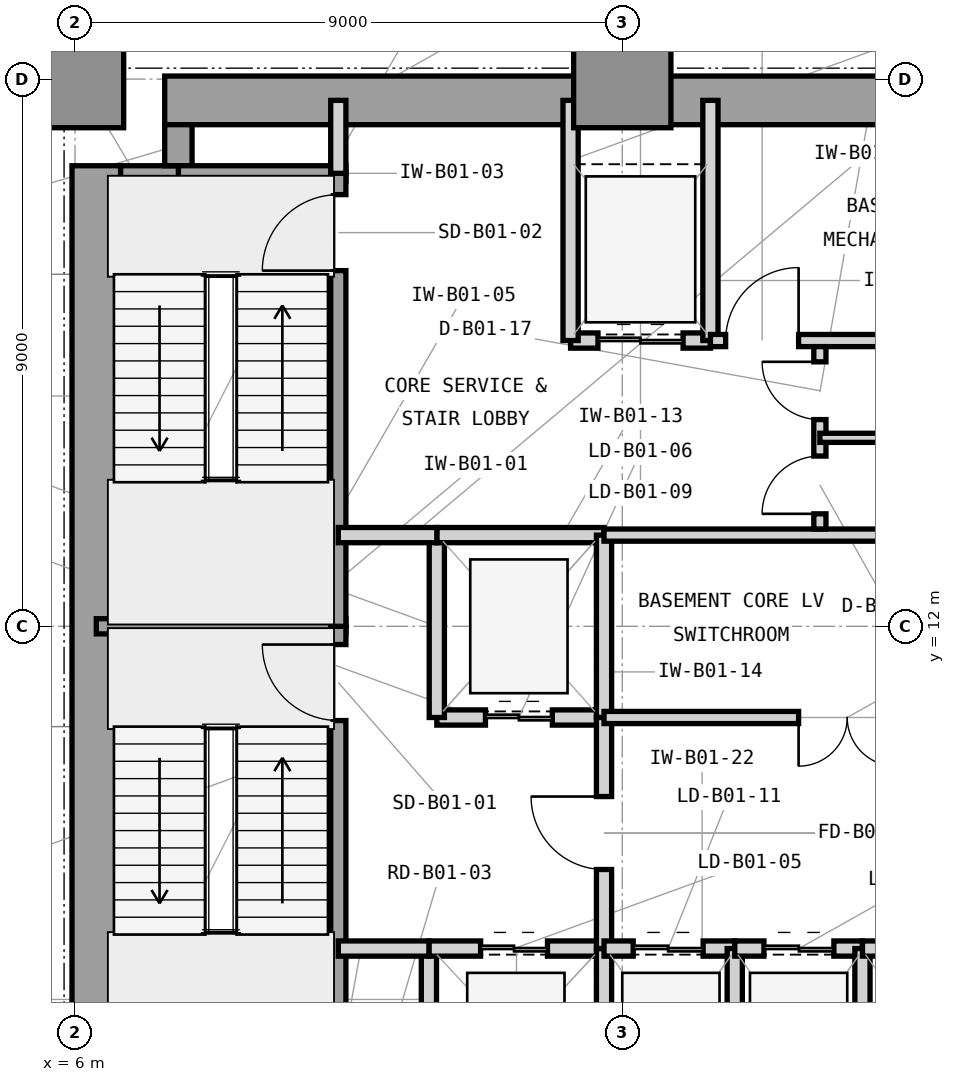
"""IFC4 building model, lengths in metres.
Left out: names, types, materials, properties, quantities, classifications, styles, units other than length and angle.
Written with IfcOpenShell. Run it as: python <this file> out.ifc"""

import sys

from ifc_helpers import new_model, si_unit, direction, frame, frame_2d, origin, origin_2d, place, context, subcontext, project, spatial, rectangle, extrude, element, fill, save


model = new_model("IFC4")
c1 = context("Model", 3, precision=1e-05, world=origin(), true_north=direction((0.0, 1.0)))
c2 = subcontext(c1, "Body", "Model", "MODEL_VIEW")
j1 = project(units=[si_unit("LENGTHUNIT", "METRE"), si_unit("PLANEANGLEUNIT", "RADIAN")], contexts=[c1])
p1 = place(None, origin())
s1 = spatial("IfcSite", under=j1, at=p1, CompositionType="ELEMENT")
p2 = place(p1, origin())
s2 = spatial("IfcBuilding", under=s1, at=p2, CompositionType="ELEMENT")
p3 = place(p2, frame((0.0, 0.0, -4.5)))
s3 = spatial("IfcBuildingStorey", under=s2, at=p3, CompositionType="ELEMENT", Elevation=-4.5)
p4 = place(p3, frame((6.35, 4.425, 0.0), z_axis=(0.0, 0.0, 1.0), x_axis=(0.0, 1.0, 0.0)))
e1 = element("IfcWall", 1, at=p4, inside=s3, PredefinedType="SHEAR", context=c2, shape_type="SweptSolid", body=[
    extrude(rectangle(XDim=15.15, YDim=0.8, at=frame_2d((7.575, 0.0))), origin(), (0.0, 0.0, 1.0), 4.5),
])
p5 = place(p3, frame((7.475, 20.65, 0.0), z_axis=(0.0, 0.0, 1.0), x_axis=(1.0, 0.0, 0.0)))
e2 = element("IfcWall", 2, at=p5, inside=s3, PredefinedType="SHEAR", context=c2, shape_type="SweptSolid", body=[
    extrude(rectangle(XDim=12.325, YDim=0.8, at=frame_2d((6.163, 0.0))), origin(), (0.0, 0.0, 1.0), 4.5),
])
p6 = place(p3, frame((6.75, 19.35, 0.0), z_axis=(0.0, 0.0, 1.0), x_axis=(1.0, 0.0, 0.0)))
e3 = element("IfcWall", 3, at=p6, inside=s3, PredefinedType="SHEAR", context=c2, shape_type="SweptSolid", body=[
    extrude(rectangle(XDim=1.175, YDim=0.45, at=frame_2d((0.587, 0.0))), origin(), (0.0, 0.0, 1.0), 4.5),
])
p7 = place(p3, frame((7.7, 19.575, 0.0), z_axis=(0.0, 0.0, 1.0), x_axis=(0.0, 1.0, 0.0)))
e4 = element("IfcWall", 4, at=p7, inside=s3, PredefinedType="SHEAR", context=c2, shape_type="SweptSolid", body=[
    extrude(rectangle(XDim=0.675, YDim=0.45, at=frame_2d((0.337, 0.0))), origin(), (0.0, 0.0, 1.0), 4.5),
])
for number, where, z_axis, x_axis in (
    (5, (6.0, 21.0, 0.0), (0.0, 0.0, 1.0), (1.0, 0.0, 0.0)),
    (6, (15.0, 21.0, 0.0), (0.0, 0.0, 1.0), (1.0, 0.0, 0.0)),
):
    element("IfcColumn", number, at=place(p3, frame(where, z_axis=z_axis, x_axis=x_axis)), inside=s3, PredefinedType="COLUMN", context=c2, shape_type="SweptSolid", body=[
        extrude(rectangle(XDim=1.6, YDim=1.6, at=origin_2d()), origin(), (0.0, 0.0, 1.0), 4.5),
    ])
p8 = place(p3, frame((6.35, 12.0, 0.0), z_axis=(0.0, 0.0, 1.0), x_axis=(1.0, 0.0, 0.0)))
e7 = element("IfcWall", 7, at=p8, inside=s3, PredefinedType="SHEAR", context=c2, shape_type="SweptSolid", body=[
    extrude(rectangle(XDim=4.105, YDim=0.25, at=frame_2d((2.052, 0.0))), origin(), (0.0, 0.0, 1.0), 4.5),
])
p9 = place(p3, frame((7.7, 19.45, 0.0), z_axis=(0.0, 0.0, 1.0), x_axis=(1.0, 0.0, 0.0)))
e8 = element("IfcWall", 8, at=p9, inside=s3, PredefinedType="SHEAR", context=c2, shape_type="SweptSolid", body=[
    extrude(rectangle(XDim=2.755, YDim=0.25, at=frame_2d((1.377, 0.0))), origin(), (0.0, 0.0, 1.0), 4.5),
])
p10 = place(p3, frame((10.33, 4.55, 0.0), z_axis=(0.0, 0.0, 1.0), x_axis=(0.0, 1.0, 0.0)))
e9 = element("IfcWall", 9, at=p10, inside=s3, PredefinedType="SHEAR", context=c2, shape_type="SweptSolid", body=[
    extrude(rectangle(XDim=7.45, YDim=0.25, at=frame_2d((3.725, 0.0))), origin(), (0.0, 0.0, 1.0), 4.5),
])
p11 = place(p10, frame((5.9, 0.0, 0.0)))
e10 = element("IfcOpeningElement", 10, at=p11, cuts=e9, PredefinedType="OPENING", context=c2, shape_type="SweptSolid", body=[
    extrude(rectangle(XDim=1.25, YDim=2.2, at=frame_2d((0.625, 1.1))), frame((0.0, 0.135, 0.0), z_axis=(0.0, -1.0, 0.0), x_axis=(1.0, 0.0, 0.0)), (0.0, 0.0, 1.0), 0.27),
])
p12 = place(p3, frame((10.33, 12.0, 0.0), z_axis=(0.0, 0.0, 1.0), x_axis=(0.0, 1.0, 0.0)))
e11 = element("IfcWall", 11, at=p12, inside=s3, PredefinedType="SHEAR", context=c2, shape_type="SweptSolid", body=[
    extrude(rectangle(XDim=7.45, YDim=0.25, at=frame_2d((3.725, 0.0))), origin(), (0.0, 0.0, 1.0), 4.5),
])
p13 = place(p12, frame((5.85, 0.0, 0.0)))
e12 = element("IfcOpeningElement", 12, at=p13, cuts=e11, PredefinedType="OPENING", context=c2, shape_type="SweptSolid", body=[
    extrude(rectangle(XDim=1.25, YDim=2.2, at=frame_2d((0.625, 1.1))), frame((0.0, 0.135, 0.0), z_axis=(0.0, -1.0, 0.0), x_axis=(1.0, 0.0, 0.0)), (0.0, 0.0, 1.0), 0.27),
])
p14 = place(p3, frame((11.82, 3.35, 0.0), z_axis=(0.0, 0.0, 1.0), x_axis=(0.0, 1.0, 0.0)))
e13 = element("IfcWall", 13, at=p14, inside=s3, PredefinedType="PARTITIONING", context=c2, shape_type="SweptSolid", body=[
    extrude(rectangle(XDim=3.35, YDim=0.25, at=frame_2d((1.675, 0.0))), origin(), (0.0, 0.0, 1.0), 4.19),
])
p15 = place(p3, frame((10.33, 19.45, 0.0), z_axis=(0.0, 0.0, 1.0), x_axis=(0.0, 1.0, 0.0)))
e14 = element("IfcWall", 14, at=p15, inside=s3, PredefinedType="PARTITIONING", context=c2, shape_type="SweptSolid", body=[
    extrude(rectangle(XDim=1.2, YDim=0.25, at=frame_2d((0.6, 0.0))), origin(), (0.0, 0.0, 1.0), 3.334),
])
p16 = place(p3, frame((11.82, 6.7, 0.0), z_axis=(0.0, 0.0, 1.0), x_axis=(1.0, 0.0, 0.0)))
e15 = element("IfcWall", 15, at=p16, inside=s3, PredefinedType="PARTITIONING", context=c2, shape_type="SweptSolid", body=[
    extrude(rectangle(XDim=2.88, YDim=0.25, at=frame_2d((1.44, 0.0))), origin(), (0.0, 0.0, 1.0), 3.573),
])
p17 = place(p16, frame((0.85, 0.0, 0.0)))
e16 = element("IfcOpeningElement", 16, at=p17, cuts=e15, PredefinedType="OPENING", context=c2, shape_type="SweptSolid", body=[
    extrude(rectangle(XDim=1.1, YDim=2.25, at=frame_2d((0.55, 1.125))), frame((0.0, 0.135, 0.0), z_axis=(0.0, -1.0, 0.0), x_axis=(1.0, 0.0, 0.0)), (0.0, 0.0, 1.0), 0.27),
])
p18 = place(p3, frame((14.7, 3.35, 0.0), z_axis=(0.0, 0.0, 1.0), x_axis=(0.0, 1.0, 0.0)))
e17 = element("IfcWall", 17, at=p18, inside=s3, PredefinedType="PARTITIONING", context=c2, shape_type="SweptSolid", body=[
    extrude(rectangle(XDim=3.35, YDim=0.25, at=frame_2d((1.675, 0.0))), origin(), (0.0, 0.0, 1.0), 4.19),
])
p19 = place(p3, frame((11.95, 10.5, 0.0), z_axis=(0.0, 0.0, 1.0), x_axis=(1.0, 0.0, 0.0)))
e18 = element("IfcWall", 18, at=p19, inside=s3, PredefinedType="PARTITIONING", context=c2, shape_type="SweptSolid", body=[
    extrude(rectangle(XDim=2.75, YDim=0.25, at=frame_2d((1.375, 0.0))), origin(), (0.0, 0.0, 1.0), 3.573),
])
p20 = place(p19, frame((0.8, 0.0, 0.0)))
e19 = element("IfcOpeningElement", 19, at=p20, cuts=e18, PredefinedType="OPENING", context=c2, shape_type="SweptSolid", body=[
    extrude(rectangle(XDim=1.1, YDim=2.25, at=frame_2d((0.55, 1.125))), frame((0.0, 0.135, 0.0), z_axis=(0.0, -1.0, 0.0), x_axis=(1.0, 0.0, 0.0)), (0.0, 0.0, 1.0), 0.27),
])
p21 = place(p3, frame((11.95, 10.5, 0.0), z_axis=(0.0, 0.0, 1.0), x_axis=(0.0, 1.0, 0.0)))
e20 = element("IfcWall", 20, at=p21, inside=s3, PredefinedType="PARTITIONING", context=c2, shape_type="SweptSolid", body=[
    extrude(rectangle(XDim=3.0, YDim=0.25, at=frame_2d((1.5, 0.0))), origin(), (0.0, 0.0, 1.0), 4.19),
])
p22 = place(p3, frame((11.95, 13.5, 0.0), z_axis=(0.0, 0.0, 1.0), x_axis=(1.0, 0.0, 0.0)))
e21 = element("IfcWall", 21, at=p22, inside=s3, PredefinedType="PARTITIONING", context=c2, shape_type="SweptSolid", body=[
    extrude(rectangle(XDim=2.75, YDim=0.25, at=frame_2d((1.375, 0.0))), origin(), (0.0, 0.0, 1.0), 3.573),
])
p23 = place(p3, frame((14.7, 10.5, 0.0), z_axis=(0.0, 0.0, 1.0), x_axis=(0.0, 1.0, 0.0)))
e22 = element("IfcWall", 22, at=p23, inside=s3, PredefinedType="PARTITIONING", context=c2, shape_type="SweptSolid", body=[
    extrude(rectangle(XDim=3.0, YDim=0.25, at=frame_2d((1.5, 0.0))), origin(), (0.0, 0.0, 1.0), 4.19),
])
p24 = place(p3, frame((14.7, 6.7, 0.0), z_axis=(0.0, 0.0, 1.0), x_axis=(0.0, 1.0, 0.0)))
e23 = element("IfcWall", 23, at=p24, inside=s3, PredefinedType="PARTITIONING", context=c2, shape_type="SweptSolid", body=[
    extrude(rectangle(XDim=3.8, YDim=0.25, at=frame_2d((1.9, 0.0))), origin(), (0.0, 0.0, 1.0), 4.19),
])
p25 = place(p24, frame((1.3, 0.0, 0.0)))
e24 = element("IfcOpeningElement", 24, at=p25, cuts=e23, PredefinedType="OPENING", context=c2, shape_type="SweptSolid", body=[
    extrude(rectangle(XDim=1.2, YDim=2.2, at=frame_2d((0.6, 1.1))), frame((0.0, 0.135, 0.0), z_axis=(0.0, -1.0, 0.0), x_axis=(1.0, 0.0, 0.0)), (0.0, 0.0, 1.0), 0.27),
])
p26 = place(p3, frame((10.33, 13.5, 0.0), z_axis=(0.0, 0.0, 1.0), x_axis=(1.0, 0.0, 0.0)))
e25 = element("IfcWall", 25, at=p26, inside=s3, PredefinedType="PARTITIONING", context=c2, shape_type="SweptSolid", body=[
    extrude(rectangle(XDim=1.62, YDim=0.25, at=frame_2d((0.81, 0.0))), origin(), (0.0, 0.0, 1.0), 3.573),
])
p27 = place(p3, frame((10.33, 6.7, 0.0), z_axis=(0.0, 0.0, 1.0), x_axis=(1.0, 0.0, 0.0)))
e26 = element("IfcWall", 26, at=p27, inside=s3, PredefinedType="PARTITIONING", context=c2, shape_type="SweptSolid", body=[
    extrude(rectangle(XDim=1.49, YDim=0.25, at=frame_2d((0.745, 0.0))), origin(), (0.0, 0.0, 1.0), 3.573),
])
p28 = place(p3, frame((14.15, 16.7, 0.0), z_axis=(0.0, 0.0, 1.0), x_axis=(1.0, 0.0, 0.0)))
e27 = element("IfcWall", 27, at=p28, inside=s3, PredefinedType="PARTITIONING", context=c2, shape_type="SweptSolid", body=[
    extrude(rectangle(XDim=2.3, YDim=0.25, at=frame_2d((1.15, 0.0))), origin(), (0.0, 0.0, 1.0), 3.573),
])
p29 = place(p28, frame((0.45, 0.0, 0.0)))
e28 = element("IfcOpeningElement", 28, at=p29, cuts=e27, PredefinedType="OPENING", context=c2, shape_type="SweptSolid", body=[
    extrude(rectangle(XDim=1.4, YDim=2.35, at=frame_2d((0.7, 1.175))), frame((0.0, 0.135, 0.0), z_axis=(0.0, -1.0, 0.0), x_axis=(1.0, 0.0, 0.0)), (0.0, 0.0, 1.0), 0.27),
])
for number, where, z_axis, x_axis in (
    (29, (14.15, 16.7, 0.0), (0.0, 0.0, 1.0), (0.0, 1.0, 0.0)),
    (30, (16.45, 16.7, 0.0), (0.0, 0.0, 1.0), (0.0, 1.0, 0.0)),
):
    element("IfcWall", number, at=place(p3, frame(where, z_axis=z_axis, x_axis=x_axis)), inside=s3, PredefinedType="PARTITIONING", context=c2, shape_type="SweptSolid", body=[
        extrude(rectangle(XDim=3.95, YDim=0.25, at=frame_2d((1.975, 0.0))), origin(), (0.0, 0.0, 1.0), 4.19),
    ])
p30 = place(p3, frame((16.45, 16.7, 0.0), z_axis=(0.0, 0.0, 1.0), x_axis=(1.0, 0.0, 0.0)))
e31 = element("IfcWall", 31, at=p30, inside=s3, PredefinedType="PARTITIONING", context=c2, shape_type="SweptSolid", body=[
    extrude(rectangle(XDim=7.2, YDim=0.2, at=frame_2d((3.6, 0.0))), origin(), (0.0, 0.0, 1.0), 3.573),
])
p31 = place(p30, frame((0.25, 0.0, 0.0)))
e32 = element("IfcOpeningElement", 32, at=p31, cuts=e31, PredefinedType="OPENING", context=c2, shape_type="SweptSolid", body=[
    extrude(rectangle(XDim=1.2, YDim=2.2, at=frame_2d((0.6, 1.1))), frame((0.0, 0.11, 0.0), z_axis=(0.0, -1.0, 0.0), x_axis=(1.0, 0.0, 0.0)), (0.0, 0.0, 1.0), 0.22),
])
p32 = place(p3, frame((14.7, 6.7, 0.0), z_axis=(0.0, 0.0, 1.0), x_axis=(1.0, 0.0, 0.0)))
e33 = element("IfcWall", 33, at=p32, inside=s3, PredefinedType="PARTITIONING", context=c2, shape_type="SweptSolid", body=[
    extrude(rectangle(XDim=2.15, YDim=0.25, at=frame_2d((1.075, 0.0))), origin(), (0.0, 0.0, 1.0), 3.573),
])
p33 = place(p32, frame((0.48, 0.0, 0.0)))
e34 = element("IfcOpeningElement", 34, at=p33, cuts=e33, PredefinedType="OPENING", context=c2, shape_type="SweptSolid", body=[
    extrude(rectangle(XDim=1.15, YDim=2.25, at=frame_2d((0.575, 1.125))), frame((0.0, 0.135, 0.0), z_axis=(0.0, -1.0, 0.0), x_axis=(1.0, 0.0, 0.0)), (0.0, 0.0, 1.0), 0.27),
])
p34 = place(p3, frame((16.85, 3.35, 0.0), z_axis=(0.0, 0.0, 1.0), x_axis=(0.0, 1.0, 0.0)))
e35 = element("IfcWall", 35, at=p34, inside=s3, PredefinedType="PARTITIONING", context=c2, shape_type="SweptSolid", body=[
    extrude(rectangle(XDim=3.35, YDim=0.25, at=frame_2d((1.675, 0.0))), origin(), (0.0, 0.0, 1.0), 4.19),
])
p35 = place(p3, frame((16.85, 6.7, 0.0), z_axis=(0.0, 0.0, 1.0), x_axis=(1.0, 0.0, 0.0)))
e36 = element("IfcWall", 36, at=p35, inside=s3, PredefinedType="PARTITIONING", context=c2, shape_type="SweptSolid", body=[
    extrude(rectangle(XDim=2.1, YDim=0.25, at=frame_2d((1.05, 0.0))), origin(), (0.0, 0.0, 1.0), 3.573),
])
p36 = place(p35, frame((0.48, 0.0, 0.0)))
e37 = element("IfcOpeningElement", 37, at=p36, cuts=e36, PredefinedType="OPENING", context=c2, shape_type="SweptSolid", body=[
    extrude(rectangle(XDim=1.15, YDim=2.25, at=frame_2d((0.575, 1.125))), frame((0.0, 0.135, 0.0), z_axis=(0.0, -1.0, 0.0), x_axis=(1.0, 0.0, 0.0)), (0.0, 0.0, 1.0), 0.27),
])
p37 = place(p3, frame((18.95, 3.35, 0.0), z_axis=(0.0, 0.0, 1.0), x_axis=(0.0, 1.0, 0.0)))
e38 = element("IfcWall", 38, at=p37, inside=s3, PredefinedType="PARTITIONING", context=c2, shape_type="SweptSolid", body=[
    extrude(rectangle(XDim=3.35, YDim=0.25, at=frame_2d((1.675, 0.0))), origin(), (0.0, 0.0, 1.0), 4.19),
])
p38 = place(p3, frame((18.95, 6.7, 0.0), z_axis=(0.0, 0.0, 1.0), x_axis=(1.0, 0.0, 0.0)))
e39 = element("IfcWall", 39, at=p38, inside=s3, PredefinedType="PARTITIONING", context=c2, shape_type="SweptSolid", body=[
    extrude(rectangle(XDim=2.1, YDim=0.25, at=frame_2d((1.05, 0.0))), origin(), (0.0, 0.0, 1.0), 3.573),
])
p39 = place(p38, frame((0.48, 0.0, 0.0)))
e40 = element("IfcOpeningElement", 40, at=p39, cuts=e39, PredefinedType="OPENING", context=c2, shape_type="SweptSolid", body=[
    extrude(rectangle(XDim=1.15, YDim=2.25, at=frame_2d((0.575, 1.125))), frame((0.0, 0.135, 0.0), z_axis=(0.0, -1.0, 0.0), x_axis=(1.0, 0.0, 0.0)), (0.0, 0.0, 1.0), 0.27),
])
p40 = place(p3, frame((14.7, 10.5, 0.0), z_axis=(0.0, 0.0, 1.0), x_axis=(1.0, 0.0, 0.0)))
e41 = element("IfcWall", 41, at=p40, inside=s3, PredefinedType="PARTITIONING", context=c2, shape_type="SweptSolid", body=[
    extrude(rectangle(XDim=8.95, YDim=0.2, at=frame_2d((4.475, 0.0))), origin(), (0.0, 0.0, 1.0), 3.573),
])
p41 = place(p40, frame((3.2, 0.0, 0.0)))
e42 = element("IfcOpeningElement", 42, at=p41, cuts=e41, PredefinedType="OPENING", context=c2, shape_type="SweptSolid", body=[
    extrude(rectangle(XDim=1.6, YDim=2.3, at=frame_2d((0.8, 1.15))), frame((0.0, 0.11, 0.0), z_axis=(0.0, -1.0, 0.0), x_axis=(1.0, 0.0, 0.0)), (0.0, 0.0, 1.0), 0.22),
])
p42 = place(p3, frame((14.7, 13.5, 0.0), z_axis=(0.0, 0.0, 1.0), x_axis=(1.0, 0.0, 0.0)))
e43 = element("IfcWall", 43, at=p42, inside=s3, PredefinedType="PARTITIONING", context=c2, shape_type="SweptSolid", body=[
    extrude(rectangle(XDim=8.95, YDim=0.2, at=frame_2d((4.475, 0.0))), origin(), (0.0, 0.0, 1.0), 3.573),
])
p43 = place(p3, frame((18.25, 13.6, 0.0), z_axis=(0.0, 0.0, 1.0), x_axis=(0.0, 1.0, 0.0)))
e44 = element("IfcWall", 44, at=p43, inside=s3, PredefinedType="PARTITIONING", context=c2, shape_type="SweptSolid", body=[
    extrude(rectangle(XDim=3.0, YDim=0.2, at=frame_2d((1.5, 0.0))), origin(), (0.0, 0.0, 1.0), 4.19),
])
p44 = place(p43, frame((0.25, 0.0, 0.0)))
e45 = element("IfcOpeningElement", 45, at=p44, cuts=e44, PredefinedType="OPENING", context=c2, shape_type="SweptSolid", body=[
    extrude(rectangle(XDim=0.95, YDim=2.1, at=frame_2d((0.475, 1.05))), frame((0.0, 0.11, 0.0), z_axis=(0.0, -1.0, 0.0), x_axis=(1.0, 0.0, 0.0)), (0.0, 0.0, 1.0), 0.22),
])
p45 = place(p43, frame((1.8, 0.0, 0.0)))
e46 = element("IfcOpeningElement", 46, at=p45, cuts=e44, PredefinedType="OPENING", context=c2, shape_type="SweptSolid", body=[
    extrude(rectangle(XDim=0.95, YDim=2.1, at=frame_2d((0.475, 1.05))), frame((0.0, 0.11, 0.0), z_axis=(0.0, -1.0, 0.0), x_axis=(1.0, 0.0, 0.0)), (0.0, 0.0, 1.0), 0.22),
])
p46 = place(p3, frame((18.25, 15.1, 0.0), z_axis=(0.0, 0.0, 1.0), x_axis=(1.0, 0.0, 0.0)))
e47 = element("IfcWall", 47, at=p46, inside=s3, PredefinedType="PARTITIONING", context=c2, shape_type="SweptSolid", body=[
    extrude(rectangle(XDim=5.4, YDim=0.15, at=frame_2d((2.7, 0.0))), origin(), (0.0, 0.0, 1.0), 4.19),
])
p47 = place(p11, origin())
e48 = element("IfcDoor", 48, at=p47, inside=s3, OperationType="SINGLE_SWING_RIGHT", PredefinedType="DOOR", context=c2, shape_type="SweptSolid", body=[
    extrude(rectangle(XDim=1.25, YDim=2.2, at=frame_2d((0.625, 1.1))), frame((0.0, 0.025, 0.0), z_axis=(0.0, -1.0, 0.0), x_axis=(1.0, 0.0, 0.0)), (0.0, 0.0, 1.0), 0.05),
])
fill(e10, e48)
p48 = place(p13, origin())
e49 = element("IfcDoor", 49, at=p48, inside=s3, OperationType="SINGLE_SWING_LEFT", PredefinedType="DOOR", context=c2, shape_type="SweptSolid", body=[
    extrude(rectangle(XDim=1.25, YDim=2.2, at=frame_2d((0.625, 1.1))), frame((0.0, 0.025, 0.0), z_axis=(0.0, -1.0, 0.0), x_axis=(1.0, 0.0, 0.0)), (0.0, 0.0, 1.0), 0.05),
])
fill(e12, e49)
p49 = place(p17, origin())
e50 = element("IfcDoor", 50, at=p49, inside=s3, OperationType="DOUBLE_DOOR_SLIDING", PredefinedType="DOOR", context=c2, shape_type="SweptSolid", body=[
    extrude(rectangle(XDim=1.1, YDim=2.25, at=frame_2d((0.55, 1.125))), frame((0.0, 0.025, 0.0), z_axis=(0.0, -1.0, 0.0), x_axis=(1.0, 0.0, 0.0)), (0.0, 0.0, 1.0), 0.05),
])
fill(e16, e50)
p50 = place(p20, origin())
e51 = element("IfcDoor", 51, at=p50, inside=s3, OperationType="DOUBLE_DOOR_SLIDING", PredefinedType="DOOR", context=c2, shape_type="SweptSolid", body=[
    extrude(rectangle(XDim=1.1, YDim=2.25, at=frame_2d((0.55, 1.125))), frame((0.0, 0.025, 0.0), z_axis=(0.0, -1.0, 0.0), x_axis=(1.0, 0.0, 0.0)), (0.0, 0.0, 1.0), 0.05),
])
fill(e19, e51)
p51 = place(p25, origin())
e52 = element("IfcDoor", 52, at=p51, inside=s3, OperationType="SINGLE_SWING_RIGHT", PredefinedType="DOOR", context=c2, shape_type="SweptSolid", body=[
    extrude(rectangle(XDim=1.2, YDim=2.2, at=frame_2d((0.6, 1.1))), frame((0.0, 0.025, 0.0), z_axis=(0.0, -1.0, 0.0), x_axis=(1.0, 0.0, 0.0)), (0.0, 0.0, 1.0), 0.05),
])
fill(e24, e52)
p52 = place(p29, origin())
e53 = element("IfcDoor", 53, at=p52, inside=s3, OperationType="DOUBLE_DOOR_SLIDING", PredefinedType="DOOR", context=c2, shape_type="SweptSolid", body=[
    extrude(rectangle(XDim=1.4, YDim=2.35, at=frame_2d((0.7, 1.175))), frame((0.0, 0.025, 0.0), z_axis=(0.0, -1.0, 0.0), x_axis=(1.0, 0.0, 0.0)), (0.0, 0.0, 1.0), 0.05),
])
fill(e28, e53)
p53 = place(p31, origin())
e54 = element("IfcDoor", 54, at=p53, inside=s3, OperationType="SINGLE_SWING_RIGHT", PredefinedType="DOOR", context=c2, shape_type="SweptSolid", body=[
    extrude(rectangle(XDim=1.2, YDim=2.2, at=frame_2d((0.6, 1.1))), frame((0.0, 0.025, 0.0), z_axis=(0.0, -1.0, 0.0), x_axis=(1.0, 0.0, 0.0)), (0.0, 0.0, 1.0), 0.05),
])
fill(e32, e54)
p54 = place(p33, origin())
e55 = element("IfcDoor", 55, at=p54, inside=s3, OperationType="DOUBLE_DOOR_SLIDING", PredefinedType="DOOR", context=c2, shape_type="SweptSolid", body=[
    extrude(rectangle(XDim=1.15, YDim=2.25, at=frame_2d((0.575, 1.125))), frame((0.0, 0.025, 0.0), z_axis=(0.0, -1.0, 0.0), x_axis=(1.0, 0.0, 0.0)), (0.0, 0.0, 1.0), 0.05),
])
fill(e34, e55)
p55 = place(p36, origin())
e56 = element("IfcDoor", 56, at=p55, inside=s3, OperationType="DOUBLE_DOOR_SLIDING", PredefinedType="DOOR", context=c2, shape_type="SweptSolid", body=[
    extrude(rectangle(XDim=1.15, YDim=2.25, at=frame_2d((0.575, 1.125))), frame((0.0, 0.025, 0.0), z_axis=(0.0, -1.0, 0.0), x_axis=(1.0, 0.0, 0.0)), (0.0, 0.0, 1.0), 0.05),
])
fill(e37, e56)
p56 = place(p41, frame((1.6, 0.0, 0.0), z_axis=(0.0, 0.0, 1.0), x_axis=(-1.0, 0.0, 0.0)))
e57 = element("IfcDoor", 57, at=p56, inside=s3, OperationType="DOUBLE_DOOR_SINGLE_SWING", PredefinedType="DOOR", context=c2, shape_type="SweptSolid", body=[
    extrude(rectangle(XDim=1.6, YDim=2.3, at=frame_2d((0.8, 1.15))), frame((0.0, 0.025, 0.0), z_axis=(0.0, -1.0, 0.0), x_axis=(1.0, 0.0, 0.0)), (0.0, 0.0, 1.0), 0.05),
])
fill(e42, e57)
p57 = place(p44, origin())
e58 = element("IfcDoor", 58, at=p57, inside=s3, OperationType="SINGLE_SWING_LEFT", PredefinedType="DOOR", context=c2, shape_type="SweptSolid", body=[
    extrude(rectangle(XDim=0.95, YDim=2.1, at=frame_2d((0.475, 1.05))), frame((0.0, 0.025, 0.0), z_axis=(0.0, -1.0, 0.0), x_axis=(1.0, 0.0, 0.0)), (0.0, 0.0, 1.0), 0.05),
])
fill(e45, e58)
p58 = place(p45, origin())
e59 = element("IfcDoor", 59, at=p58, inside=s3, OperationType="SINGLE_SWING_RIGHT", PredefinedType="DOOR", context=c2, shape_type="SweptSolid", body=[
    extrude(rectangle(XDim=0.95, YDim=2.1, at=frame_2d((0.475, 1.05))), frame((0.0, 0.025, 0.0), z_axis=(0.0, -1.0, 0.0), x_axis=(1.0, 0.0, 0.0)), (0.0, 0.0, 1.0), 0.05),
])
fill(e46, e59)
save(model, sys.argv[1])
